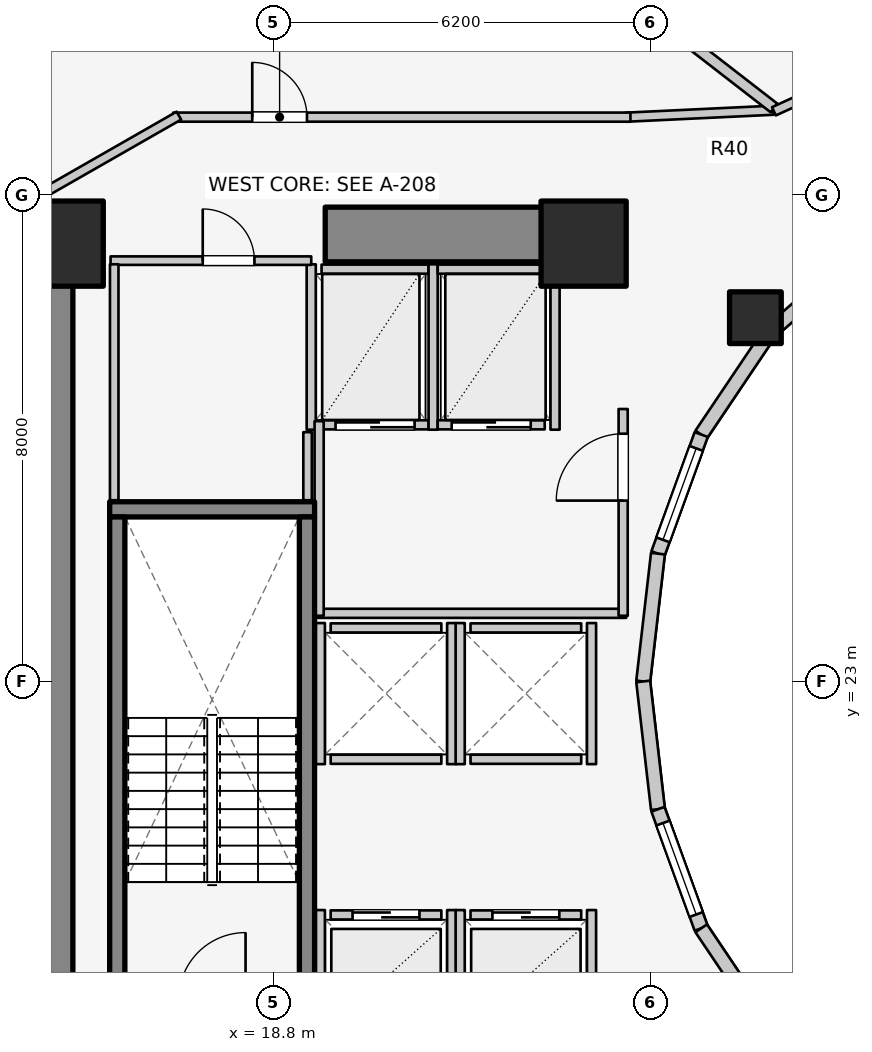
"""IFC4 building model, lengths in metres.
Left out: names, types, materials, properties, quantities, classifications, styles, units other than length and angle.
Written with IfcOpenShell. Run it as: python <this file> out.ifc"""

import sys

from ifc_helpers import new_model, si_unit, direction, frame, frame_2d, origin, origin_2d, place, context, subcontext, project, spatial, rectangle, extrude, element, fill, save


model = new_model("IFC4")
c1 = context("Model", 3, precision=1e-05, world=origin(), true_north=direction((0.0, 1.0)))
c2 = subcontext(c1, "Body", "Model", "MODEL_VIEW")
j1 = project(units=[si_unit("LENGTHUNIT", "METRE"), si_unit("PLANEANGLEUNIT", "RADIAN")], contexts=[c1])
p1 = place(None, origin())
s1 = spatial("IfcSite", under=j1, at=p1, CompositionType="ELEMENT")
p2 = place(p1, origin())
s2 = spatial("IfcBuilding", under=s1, at=p2, CompositionType="ELEMENT")
p3 = place(p2, frame((0.0, 0.0, 76.3)))
s3 = spatial("IfcBuildingStorey", under=s2, at=p3, CompositionType="ELEMENT", Elevation=76.3)
p4 = place(p3, frame((15.05, 17.05, 0.0), z_axis=(0.0, 0.0, 1.0), x_axis=(0.0, 1.0, 0.0)))
e1 = element("IfcWall", 1, at=p4, inside=s3, PredefinedType="SHEAR", context=c2, shape_type="SweptSolid", body=[
    extrude(rectangle(XDim=12.8, YDim=0.9, at=frame_2d((6.4, 0.0))), origin(), (0.0, 0.0, 1.0), 3.1),
])
p5 = place(p3, frame((19.65, 30.35, 0.0), z_axis=(0.0, 0.0, 1.0), x_axis=(1.0, 0.0, 0.0)))
e2 = element("IfcWall", 2, at=p5, inside=s3, PredefinedType="SHEAR", context=c2, shape_type="SweptSolid", body=[
    extrude(rectangle(XDim=4.5, YDim=0.9, at=frame_2d((2.25, 0.0))), origin(), (0.0, 0.0, 1.0), 3.1),
])
p6 = place(p3, frame((16.105, 25.83, 0.0), z_axis=(0.0, 0.0, 1.0), x_axis=(1.0, 0.0, 0.0)))
e3 = element("IfcWall", 3, at=p6, inside=s3, PredefinedType="SOLIDWALL", context=c2, shape_type="SweptSolid", body=[
    extrude(rectangle(XDim=3.37, YDim=0.25, at=frame_2d((1.685, 0.0))), origin(), (0.0, 0.0, 1.0), 3.1),
])
for number, where, z_axis, x_axis in (
    (4, (16.23, 17.895, 0.0), (0.0, 0.0, 1.0), (0.0, 1.0, 0.0)),
    (5, (19.35, 17.895, 0.0), (0.0, 0.0, 1.0), (0.0, 1.0, 0.0)),
):
    element("IfcWall", number, at=place(p3, frame(where, z_axis=z_axis, x_axis=x_axis)), inside=s3, PredefinedType="SOLIDWALL", context=c2, shape_type="SweptSolid", body=[
        extrude(rectangle(XDim=7.81, YDim=0.25, at=frame_2d((3.905, 0.0))), origin(), (0.0, 0.0, 1.0), 3.1),
    ])
for number, where, z_axis, x_axis in (
    (6, (23.9, 30.2, 0.0), (0.0, 0.0, 1.0), (1.0, 0.0, 0.0)),
    (7, (15.3, 30.2, 0.0), (0.0, 0.0, 1.0), (1.0, 0.0, 0.0)),
):
    element("IfcColumn", number, at=place(p3, frame(where, z_axis=z_axis, x_axis=x_axis)), inside=s3, PredefinedType="COLUMN", context=c2, shape_type="SweptSolid", body=[
        extrude(rectangle(XDim=1.4, YDim=1.4, at=origin_2d()), origin(), (0.0, 0.0, 1.0), 3.1),
    ])
p7 = place(p3, frame((26.725, 28.982, 0.0), z_axis=(0.0, 0.0, 1.0), x_axis=(1.0, 0.0, 0.0)))
e8 = element("IfcColumn", 8, at=p7, inside=s3, PredefinedType="COLUMN", context=c2, shape_type="SweptSolid", body=[
    extrude(rectangle(XDim=0.85, YDim=0.85, at=origin_2d()), origin(), (0.0, 0.0, 1.0), 3.1),
])
p8 = place(p3, frame((28.44, 30.032, 0.0), z_axis=(0.0, 0.0, 1.0), x_axis=(-0.752576694707, -0.658504607869, 0.0)))
e9 = element("IfcWall", 9, at=p8, inside=s3, PredefinedType="STANDARD", context=c2, shape_type="SweptSolid", body=[
    extrude(rectangle(XDim=1.959, YDim=0.23, at=frame_2d((0.98, 0.0))), origin(), (0.0, 0.0, 1.0), 2.16),
])
p9 = place(p3, frame((26.965, 28.742, 0.0), z_axis=(0.0, 0.0, 1.0), x_axis=(-0.558197800898, -0.829707909492, 0.0)))
e10 = element("IfcWall", 10, at=p9, inside=s3, PredefinedType="STANDARD", context=c2, shape_type="SweptSolid", body=[
    extrude(rectangle(XDim=2.027, YDim=0.23, at=frame_2d((1.013, 0.0))), origin(), (0.0, 0.0, 1.0), 2.16),
])
p10 = place(p3, frame((25.834, 27.06, 0.0), z_axis=(0.0, 0.0, 1.0), x_axis=(-0.341423187295, -0.93990968033, 0.0)))
e11 = element("IfcWall", 11, at=p10, inside=s3, PredefinedType="STANDARD", context=c2, shape_type="SweptSolid", body=[
    extrude(rectangle(XDim=2.084, YDim=0.23, at=frame_2d((1.042, 0.0))), origin(), (0.0, 0.0, 1.0), 2.84),
])
p11 = place(p10, frame((0.242, 0.0, 0.85)))
e12 = element("IfcOpeningElement", 12, at=p11, cuts=e11, PredefinedType="OPENING", context=c2, shape_type="SweptSolid", body=[
    extrude(rectangle(XDim=1.6, YDim=1.65, at=frame_2d((0.8, 0.825))), frame((0.0, 0.125, 0.0), z_axis=(0.0, -1.0, 0.0), x_axis=(1.0, 0.0, 0.0)), (0.0, 0.0, 1.0), 0.25),
])
for number, where, z_axis, x_axis in (
    (13, (25.123, 25.102, 0.0), (0.0, 0.0, 1.0), (-0.115, -0.993, 0.0)),
    (14, (24.88, 23.0, 0.0), (0.0, 0.0, 1.0), (0.115, -0.993, 0.0)),
):
    element("IfcWall", number, at=place(p3, frame(where, z_axis=z_axis, x_axis=x_axis)), inside=s3, PredefinedType="STANDARD", context=c2, shape_type="SweptSolid", body=[
        extrude(rectangle(XDim=2.115, YDim=0.23, at=frame_2d((1.058, 0.0))), origin(), (0.0, 0.0, 1.0), 2.84),
    ])
p12 = place(p3, frame((25.123, 20.898, 0.0), z_axis=(0.0, 0.0, 1.0), x_axis=(0.341423187295, -0.93990968033, 0.0)))
e15 = element("IfcWall", 15, at=p12, inside=s3, PredefinedType="STANDARD", context=c2, shape_type="SweptSolid", body=[
    extrude(rectangle(XDim=2.084, YDim=0.23, at=frame_2d((1.042, 0.0))), origin(), (0.0, 0.0, 1.0), 2.84),
])
p13 = place(p12, frame((0.242, 0.0, 0.85)))
e16 = element("IfcOpeningElement", 16, at=p13, cuts=e15, PredefinedType="OPENING", context=c2, shape_type="SweptSolid", body=[
    extrude(rectangle(XDim=1.6, YDim=1.65, at=frame_2d((0.8, 0.825))), frame((0.0, 0.125, 0.0), z_axis=(0.0, -1.0, 0.0), x_axis=(1.0, 0.0, 0.0)), (0.0, 0.0, 1.0), 0.25),
])
p14 = place(p3, frame((25.834, 18.94, 0.0), z_axis=(0.0, 0.0, 1.0), x_axis=(0.558197800898, -0.829707909492, 0.0)))
e17 = element("IfcWall", 17, at=p14, inside=s3, PredefinedType="STANDARD", context=c2, shape_type="SweptSolid", body=[
    extrude(rectangle(XDim=2.027, YDim=0.23, at=frame_2d((1.013, 0.0))), origin(), (0.0, 0.0, 1.0), 2.16),
])
p15 = place(p3, frame((19.74, 19.16, 0.0), z_axis=(0.0, 0.0, 1.0), x_axis=(1.0, 0.0, 0.0)))
e18 = element("IfcWall", 18, at=p15, inside=s3, PredefinedType="SOLIDWALL", context=c2, shape_type="SweptSolid", body=[
    extrude(rectangle(XDim=1.82, YDim=0.15, at=frame_2d((0.91, 0.0))), origin(), (0.0, 0.0, 1.0), 2.855),
])
p16 = place(p15, frame((0.36, 0.0, 0.0)))
e19 = element("IfcOpeningElement", 19, at=p16, cuts=e18, PredefinedType="OPENING", context=c2, shape_type="SweptSolid", body=[
    extrude(rectangle(XDim=1.1, YDim=2.1, at=frame_2d((0.55, 1.05))), frame((0.0, 0.085, 0.0), z_axis=(0.0, -1.0, 0.0), x_axis=(1.0, 0.0, 0.0)), (0.0, 0.0, 1.0), 0.17),
])
p17 = place(p3, frame((19.57, 17.02, 0.0), z_axis=(0.0, 0.0, 1.0), x_axis=(0.0, 1.0, 0.0)))
e20 = element("IfcWall", 20, at=p17, inside=s3, PredefinedType="SOLIDWALL", context=c2, shape_type="SweptSolid", body=[
    extrude(rectangle(XDim=2.22, YDim=0.15, at=frame_2d((1.11, 0.0))), origin(), (0.0, 0.0, 1.0), 2.12),
])
p18 = place(p3, frame((21.73, 17.02, 0.0), z_axis=(0.0, 0.0, 1.0), x_axis=(0.0, 1.0, 0.0)))
e21 = element("IfcWall", 21, at=p18, inside=s3, PredefinedType="SOLIDWALL", context=c2, shape_type="SweptSolid", body=[
    extrude(rectangle(XDim=2.22, YDim=0.15, at=frame_2d((1.11, 0.0))), origin(), (0.0, 0.0, 1.0), 2.855),
])
p19 = place(p3, frame((22.04, 19.16, 0.0), z_axis=(0.0, 0.0, 1.0), x_axis=(1.0, 0.0, 0.0)))
e22 = element("IfcWall", 22, at=p19, inside=s3, PredefinedType="SOLIDWALL", context=c2, shape_type="SweptSolid", body=[
    extrude(rectangle(XDim=1.82, YDim=0.15, at=frame_2d((0.91, 0.0))), origin(), (0.0, 0.0, 1.0), 2.12),
])
p20 = place(p19, frame((0.36, 0.0, 0.0)))
e23 = element("IfcOpeningElement", 23, at=p20, cuts=e22, PredefinedType="OPENING", context=c2, shape_type="SweptSolid", body=[
    extrude(rectangle(XDim=1.1, YDim=2.1, at=frame_2d((0.55, 1.05))), frame((0.0, 0.085, 0.0), z_axis=(0.0, -1.0, 0.0), x_axis=(1.0, 0.0, 0.0)), (0.0, 0.0, 1.0), 0.17),
])
p21 = place(p3, frame((21.87, 17.02, 0.0), z_axis=(0.0, 0.0, 1.0), x_axis=(0.0, 1.0, 0.0)))
e24 = element("IfcWall", 24, at=p21, inside=s3, PredefinedType="SOLIDWALL", context=c2, shape_type="SweptSolid", body=[
    extrude(rectangle(XDim=2.22, YDim=0.15, at=frame_2d((1.11, 0.0))), origin(), (0.0, 0.0, 1.0), 2.855),
])
p22 = place(p3, frame((24.03, 17.02, 0.0), z_axis=(0.0, 0.0, 1.0), x_axis=(0.0, 1.0, 0.0)))
e25 = element("IfcWall", 25, at=p22, inside=s3, PredefinedType="SOLIDWALL", context=c2, shape_type="SweptSolid", body=[
    extrude(rectangle(XDim=2.22, YDim=0.15, at=frame_2d((1.11, 0.0))), origin(), (0.0, 0.0, 1.0), 2.12),
])
for number, where, z_axis, x_axis in (
    (26, (19.74, 21.72, 0.0), (0.0, 0.0, 1.0), (1.0, 0.0, 0.0)),
    (27, (19.74, 23.88, 0.0), (0.0, 0.0, 1.0), (1.0, 0.0, 0.0)),
):
    element("IfcWall", number, at=place(p3, frame(where, z_axis=z_axis, x_axis=x_axis)), inside=s3, PredefinedType="SOLIDWALL", context=c2, shape_type="SweptSolid", body=[
        extrude(rectangle(XDim=1.82, YDim=0.15, at=frame_2d((0.91, 0.0))), origin(), (0.0, 0.0, 1.0), 2.855),
    ])
for number, where, z_axis, x_axis in (
    (28, (19.57, 21.64, 0.0), (0.0, 0.0, 1.0), (0.0, 1.0, 0.0)),
    (29, (21.73, 21.64, 0.0), (0.0, 0.0, 1.0), (0.0, 1.0, 0.0)),
):
    element("IfcWall", number, at=place(p3, frame(where, z_axis=z_axis, x_axis=x_axis)), inside=s3, PredefinedType="SOLIDWALL", context=c2, shape_type="SweptSolid", body=[
        extrude(rectangle(XDim=2.32, YDim=0.15, at=frame_2d((1.16, 0.0))), origin(), (0.0, 0.0, 1.0), 2.855),
    ])
for number, where, z_axis, x_axis in (
    (30, (22.04, 21.72, 0.0), (0.0, 0.0, 1.0), (1.0, 0.0, 0.0)),
    (31, (22.04, 23.88, 0.0), (0.0, 0.0, 1.0), (1.0, 0.0, 0.0)),
):
    element("IfcWall", number, at=place(p3, frame(where, z_axis=z_axis, x_axis=x_axis)), inside=s3, PredefinedType="SOLIDWALL", context=c2, shape_type="SweptSolid", body=[
        extrude(rectangle(XDim=1.82, YDim=0.15, at=frame_2d((0.91, 0.0))), origin(), (0.0, 0.0, 1.0), 2.12),
    ])
p23 = place(p3, frame((21.87, 21.64, 0.0), z_axis=(0.0, 0.0, 1.0), x_axis=(0.0, 1.0, 0.0)))
e32 = element("IfcWall", 32, at=p23, inside=s3, PredefinedType="SOLIDWALL", context=c2, shape_type="SweptSolid", body=[
    extrude(rectangle(XDim=2.32, YDim=0.15, at=frame_2d((1.16, 0.0))), origin(), (0.0, 0.0, 1.0), 2.855),
])
p24 = place(p3, frame((24.03, 21.64, 0.0), z_axis=(0.0, 0.0, 1.0), x_axis=(0.0, 1.0, 0.0)))
e33 = element("IfcWall", 33, at=p24, inside=s3, PredefinedType="SOLIDWALL", context=c2, shape_type="SweptSolid", body=[
    extrude(rectangle(XDim=2.32, YDim=0.15, at=frame_2d((1.16, 0.0))), origin(), (0.0, 0.0, 1.0), 2.12),
])
p25 = place(p3, frame((19.59, 27.22, 0.0), z_axis=(0.0, 0.0, 1.0), x_axis=(1.0, 0.0, 0.0)))
e34 = element("IfcWall", 34, at=p25, inside=s3, PredefinedType="SOLIDWALL", context=c2, shape_type="SweptSolid", body=[
    extrude(rectangle(XDim=1.76, YDim=0.15, at=frame_2d((0.88, 0.0))), origin(), (0.0, 0.0, 1.0), 2.855),
])
p26 = place(p25, frame((0.23, 0.0, 0.0)))
e35 = element("IfcOpeningElement", 35, at=p26, cuts=e34, PredefinedType="OPENING", context=c2, shape_type="SweptSolid", body=[
    extrude(rectangle(XDim=1.3, YDim=2.1, at=frame_2d((0.65, 1.05))), frame((0.0, 0.085, 0.0), z_axis=(0.0, -1.0, 0.0), x_axis=(1.0, 0.0, 0.0)), (0.0, 0.0, 1.0), 0.17),
])
p27 = place(p3, frame((19.59, 29.78, 0.0), z_axis=(0.0, 0.0, 1.0), x_axis=(1.0, 0.0, 0.0)))
e36 = element("IfcWall", 36, at=p27, inside=s3, PredefinedType="SOLIDWALL", context=c2, shape_type="SweptSolid", body=[
    extrude(rectangle(XDim=1.76, YDim=0.15, at=frame_2d((0.88, 0.0))), origin(), (0.0, 0.0, 1.0), 2.855),
])
for number, where, z_axis, x_axis in (
    (37, (19.42, 27.14, 0.0), (0.0, 0.0, 1.0), (0.0, 1.0, 0.0)),
    (38, (21.425, 27.14, 0.0), (0.0, 0.0, 1.0), (0.0, 1.0, 0.0)),
):
    element("IfcWall", number, at=place(p3, frame(where, z_axis=z_axis, x_axis=x_axis)), inside=s3, PredefinedType="SOLIDWALL", context=c2, shape_type="SweptSolid", body=[
        extrude(rectangle(XDim=2.72, YDim=0.15, at=frame_2d((1.36, 0.0))), origin(), (0.0, 0.0, 1.0), 2.855),
    ])
p28 = place(p3, frame((21.5, 27.22, 0.0), z_axis=(0.0, 0.0, 1.0), x_axis=(1.0, 0.0, 0.0)))
e39 = element("IfcWall", 39, at=p28, inside=s3, PredefinedType="SOLIDWALL", context=c2, shape_type="SweptSolid", body=[
    extrude(rectangle(XDim=1.76, YDim=0.15, at=frame_2d((0.88, 0.0))), origin(), (0.0, 0.0, 1.0), 2.855),
])
p29 = place(p28, frame((0.23, 0.0, 0.0)))
e40 = element("IfcOpeningElement", 40, at=p29, cuts=e39, PredefinedType="OPENING", context=c2, shape_type="SweptSolid", body=[
    extrude(rectangle(XDim=1.3, YDim=2.1, at=frame_2d((0.65, 1.05))), frame((0.0, 0.085, 0.0), z_axis=(0.0, -1.0, 0.0), x_axis=(1.0, 0.0, 0.0)), (0.0, 0.0, 1.0), 0.17),
])
p30 = place(p3, frame((21.5, 29.78, 0.0), z_axis=(0.0, 0.0, 1.0), x_axis=(1.0, 0.0, 0.0)))
e41 = element("IfcWall", 41, at=p30, inside=s3, PredefinedType="SOLIDWALL", context=c2, shape_type="SweptSolid", body=[
    extrude(rectangle(XDim=1.76, YDim=0.15, at=frame_2d((0.88, 0.0))), origin(), (0.0, 0.0, 1.0), 2.855),
])
p31 = place(p3, frame((23.43, 27.14, 0.0), z_axis=(0.0, 0.0, 1.0), x_axis=(0.0, 1.0, 0.0)))
e42 = element("IfcWall", 42, at=p31, inside=s3, PredefinedType="SOLIDWALL", context=c2, shape_type="SweptSolid", body=[
    extrude(rectangle(XDim=2.72, YDim=0.15, at=frame_2d((1.36, 0.0))), origin(), (0.0, 0.0, 1.0), 2.855),
])
p32 = place(p3, frame((19.52, 24.12, 0.0), z_axis=(0.0, 0.0, 1.0), x_axis=(1.0, 0.0, 0.0)))
e43 = element("IfcWall", 43, at=p32, inside=s3, PredefinedType="PARTITIONING", context=c2, shape_type="SweptSolid", body=[
    extrude(rectangle(XDim=5.08, YDim=0.15, at=frame_2d((2.54, 0.0))), origin(), (0.0, 0.0, 1.0), 2.12),
])
p33 = place(p3, frame((19.55, 24.08, 0.0), z_axis=(0.0, 0.0, 1.0), x_axis=(0.0, 1.0, 0.0)))
e44 = element("IfcWall", 44, at=p33, inside=s3, PredefinedType="PARTITIONING", context=c2, shape_type="SweptSolid", body=[
    extrude(rectangle(XDim=3.2, YDim=0.15, at=frame_2d((1.6, 0.0))), origin(), (0.0, 0.0, 1.0), 2.855),
])
p34 = place(p3, frame((24.55, 24.08, 0.0), z_axis=(0.0, 0.0, 1.0), x_axis=(0.0, 1.0, 0.0)))
e45 = element("IfcWall", 45, at=p34, inside=s3, PredefinedType="PARTITIONING", context=c2, shape_type="SweptSolid", body=[
    extrude(rectangle(XDim=3.4, YDim=0.15, at=frame_2d((1.7, 0.0))), origin(), (0.0, 0.0, 1.0), 2.855),
])
p35 = place(p34, frame((1.894, 0.0, 0.0)))
e46 = element("IfcOpeningElement", 46, at=p35, cuts=e45, PredefinedType="OPENING", context=c2, shape_type="SweptSolid", body=[
    extrude(rectangle(XDim=1.1, YDim=2.1, at=frame_2d((0.55, 1.05))), frame((0.0, 0.085, 0.0), z_axis=(0.0, -1.0, 0.0), x_axis=(1.0, 0.0, 0.0)), (0.0, 0.0, 1.0), 0.17),
])
p36 = place(p3, frame((16.12, 29.92, 0.0), z_axis=(0.0, 0.0, 1.0), x_axis=(1.0, 0.0, 0.0)))
e47 = element("IfcWall", 47, at=p36, inside=s3, PredefinedType="PLUMBINGWALL", context=c2, shape_type="SweptSolid", body=[
    extrude(rectangle(XDim=3.3, YDim=0.14, at=frame_2d((1.65, 0.0))), origin(), (0.0, 0.0, 1.0), 2.855),
])
p37 = place(p36, frame((1.516, 0.0, 0.0)))
e48 = element("IfcOpeningElement", 48, at=p37, cuts=e47, PredefinedType="OPENING", context=c2, shape_type="SweptSolid", body=[
    extrude(rectangle(XDim=0.85, YDim=2.05, at=frame_2d((0.425, 1.025))), frame((0.0, 0.08, 0.0), z_axis=(0.0, -1.0, 0.0), x_axis=(1.0, 0.0, 0.0)), (0.0, 0.0, 1.0), 0.16),
])
p38 = place(p3, frame((16.18, 25.98, 0.0), z_axis=(0.0, 0.0, 1.0), x_axis=(0.0, 1.0, 0.0)))
e49 = element("IfcWall", 49, at=p38, inside=s3, PredefinedType="PLUMBINGWALL", context=c2, shape_type="SweptSolid", body=[
    extrude(rectangle(XDim=3.88, YDim=0.14, at=frame_2d((1.94, 0.0))), origin(), (0.0, 0.0, 1.0), 2.855),
])
p39 = place(p3, frame((19.36, 25.98, 0.0), z_axis=(0.0, 0.0, 1.0), x_axis=(0.0, 1.0, 0.0)))
e50 = element("IfcWall", 50, at=p39, inside=s3, PredefinedType="PLUMBINGWALL", context=c2, shape_type="SweptSolid", body=[
    extrude(rectangle(XDim=1.12, YDim=0.14, at=frame_2d((0.56, 0.0))), origin(), (0.0, 0.0, 1.0), 2.855),
])
p40 = place(p3, frame((27.02, 32.394, 0.0), z_axis=(0.0, 0.0, 1.0), x_axis=(-0.998877427952, -0.047369651964, 0.0)))
e51 = element("IfcWall", 51, at=p40, inside=s3, PredefinedType="PARTITIONING", context=c2, shape_type="SweptSolid", body=[
    extrude(rectangle(XDim=2.433, YDim=0.15, at=frame_2d((1.216, 0.0))), origin(), (0.0, 0.0, 1.0), 2.272),
])
p41 = place(p3, frame((17.15, 32.28, 0.0), z_axis=(0.0, 0.0, 1.0), x_axis=(1.0, 0.0, 0.0)))
e52 = element("IfcWall", 52, at=p41, inside=s3, PredefinedType="PARTITIONING", context=c2, shape_type="SweptSolid", body=[
    extrude(rectangle(XDim=7.52, YDim=0.15, at=frame_2d((3.76, 0.0))), origin(), (0.0, 0.0, 1.0), 2.272),
])
p42 = place(p41, frame((1.3, 0.0, 0.0)))
e53 = element("IfcOpeningElement", 53, at=p42, cuts=e52, PredefinedType="OPENING", context=c2, shape_type="SweptSolid", body=[
    extrude(rectangle(XDim=0.9, YDim=2.1, at=frame_2d((0.45, 1.05))), frame((0.0, 0.085, 0.0), z_axis=(0.0, -1.0, 0.0), x_axis=(1.0, 0.0, 0.0)), (0.0, 0.0, 1.0), 0.17),
])
p43 = place(p3, frame((17.243, 32.305, 0.0), z_axis=(0.0, 0.0, 1.0), x_axis=(-0.867991349648, -0.496579315857, 0.0)))
e54 = element("IfcWall", 54, at=p43, inside=s3, PredefinedType="PARTITIONING", context=c2, shape_type="SweptSolid", body=[
    extrude(rectangle(XDim=2.567, YDim=0.15, at=frame_2d((1.283, 0.0))), origin(), (0.0, 0.0, 1.0), 2.142),
])
p44 = place(p3, frame((27.031, 32.43, 0.0), z_axis=(0.0, 0.0, 1.0), x_axis=(-0.790421780952, 0.612562983045, 0.0)))
e55 = element("IfcWall", 55, at=p44, inside=s3, PredefinedType="PARTITIONING", context=c2, shape_type="SweptSolid", body=[
    extrude(rectangle(XDim=9.662, YDim=0.18, at=frame_2d((4.831, 0.0))), origin(), (0.0, 0.0, 1.0), 2.272),
])
p45 = place(p3, frame((29.496, 33.501, 0.0), z_axis=(0.0, 0.0, 1.0), x_axis=(-0.909730151902, -0.415200012909, 0.0)))
e56 = element("IfcWall", 56, at=p45, inside=s3, PredefinedType="PARTITIONING", context=c2, shape_type="SweptSolid", body=[
    extrude(rectangle(XDim=2.711, YDim=0.15, at=frame_2d((1.355, 0.0))), origin(), (0.0, 0.0, 1.0), 2.272),
])
p46 = place(p11, origin())
e57 = element("IfcWindow", 57, at=p46, inside=s3, PartitioningType="SINGLE_PANEL", PredefinedType="WINDOW", context=c2, shape_type="SweptSolid", body=[
    extrude(rectangle(XDim=1.6, YDim=1.65, at=frame_2d((0.8, 0.825))), frame((0.0, 0.03, 0.0), z_axis=(0.0, -1.0, 0.0), x_axis=(1.0, 0.0, 0.0)), (0.0, 0.0, 1.0), 0.06),
])
fill(e12, e57)
p47 = place(p13, origin())
e58 = element("IfcWindow", 58, at=p47, inside=s3, PartitioningType="SINGLE_PANEL", PredefinedType="WINDOW", context=c2, shape_type="SweptSolid", body=[
    extrude(rectangle(XDim=1.6, YDim=1.65, at=frame_2d((0.8, 0.825))), frame((0.0, 0.03, 0.0), z_axis=(0.0, -1.0, 0.0), x_axis=(1.0, 0.0, 0.0)), (0.0, 0.0, 1.0), 0.06),
])
fill(e16, e58)
p48 = place(p16, origin())
e59 = element("IfcDoor", 59, at=p48, inside=s3, OperationType="DOUBLE_DOOR_SLIDING", PredefinedType="DOOR", context=c2, shape_type="SweptSolid", body=[
    extrude(rectangle(XDim=1.1, YDim=2.1, at=frame_2d((0.55, 1.05))), frame((0.0, 0.025, 0.0), z_axis=(0.0, -1.0, 0.0), x_axis=(1.0, 0.0, 0.0)), (0.0, 0.0, 1.0), 0.05),
])
fill(e19, e59)
p49 = place(p20, origin())
e60 = element("IfcDoor", 60, at=p49, inside=s3, OperationType="DOUBLE_DOOR_SLIDING", PredefinedType="DOOR", context=c2, shape_type="SweptSolid", body=[
    extrude(rectangle(XDim=1.1, YDim=2.1, at=frame_2d((0.55, 1.05))), frame((0.0, 0.025, 0.0), z_axis=(0.0, -1.0, 0.0), x_axis=(1.0, 0.0, 0.0)), (0.0, 0.0, 1.0), 0.05),
])
fill(e23, e60)
p50 = place(p26, origin())
e61 = element("IfcDoor", 61, at=p50, inside=s3, OperationType="DOUBLE_DOOR_SLIDING", PredefinedType="DOOR", context=c2, shape_type="SweptSolid", body=[
    extrude(rectangle(XDim=1.3, YDim=2.1, at=frame_2d((0.65, 1.05))), frame((0.0, 0.025, 0.0), z_axis=(0.0, -1.0, 0.0), x_axis=(1.0, 0.0, 0.0)), (0.0, 0.0, 1.0), 0.05),
])
fill(e35, e61)
p51 = place(p29, origin())
e62 = element("IfcDoor", 62, at=p51, inside=s3, OperationType="DOUBLE_DOOR_SLIDING", PredefinedType="DOOR", context=c2, shape_type="SweptSolid", body=[
    extrude(rectangle(XDim=1.3, YDim=2.1, at=frame_2d((0.65, 1.05))), frame((0.0, 0.025, 0.0), z_axis=(0.0, -1.0, 0.0), x_axis=(1.0, 0.0, 0.0)), (0.0, 0.0, 1.0), 0.05),
])
fill(e40, e62)
p52 = place(p35, origin())
e63 = element("IfcDoor", 63, at=p52, inside=s3, OperationType="SINGLE_SWING_LEFT", PredefinedType="DOOR", context=c2, shape_type="SweptSolid", body=[
    extrude(rectangle(XDim=1.1, YDim=2.1, at=frame_2d((0.55, 1.05))), frame((0.0, 0.025, 0.0), z_axis=(0.0, -1.0, 0.0), x_axis=(1.0, 0.0, 0.0)), (0.0, 0.0, 1.0), 0.05),
])
fill(e46, e63)
p53 = place(p37, origin())
e64 = element("IfcDoor", 64, at=p53, inside=s3, OperationType="SINGLE_SWING_LEFT", PredefinedType="DOOR", context=c2, shape_type="SweptSolid", body=[
    extrude(rectangle(XDim=0.85, YDim=2.05, at=frame_2d((0.425, 1.025))), frame((0.0, 0.025, 0.0), z_axis=(0.0, -1.0, 0.0), x_axis=(1.0, 0.0, 0.0)), (0.0, 0.0, 1.0), 0.05),
])
fill(e48, e64)
p54 = place(p42, origin())
e65 = element("IfcDoor", 65, at=p54, inside=s3, OperationType="SINGLE_SWING_LEFT", PredefinedType="DOOR", context=c2, shape_type="SweptSolid", body=[
    extrude(rectangle(XDim=0.9, YDim=2.1, at=frame_2d((0.45, 1.05))), frame((0.0, 0.025, 0.0), z_axis=(0.0, -1.0, 0.0), x_axis=(1.0, 0.0, 0.0)), (0.0, 0.0, 1.0), 0.05),
])
fill(e53, e65)
save(model, sys.argv[1])
